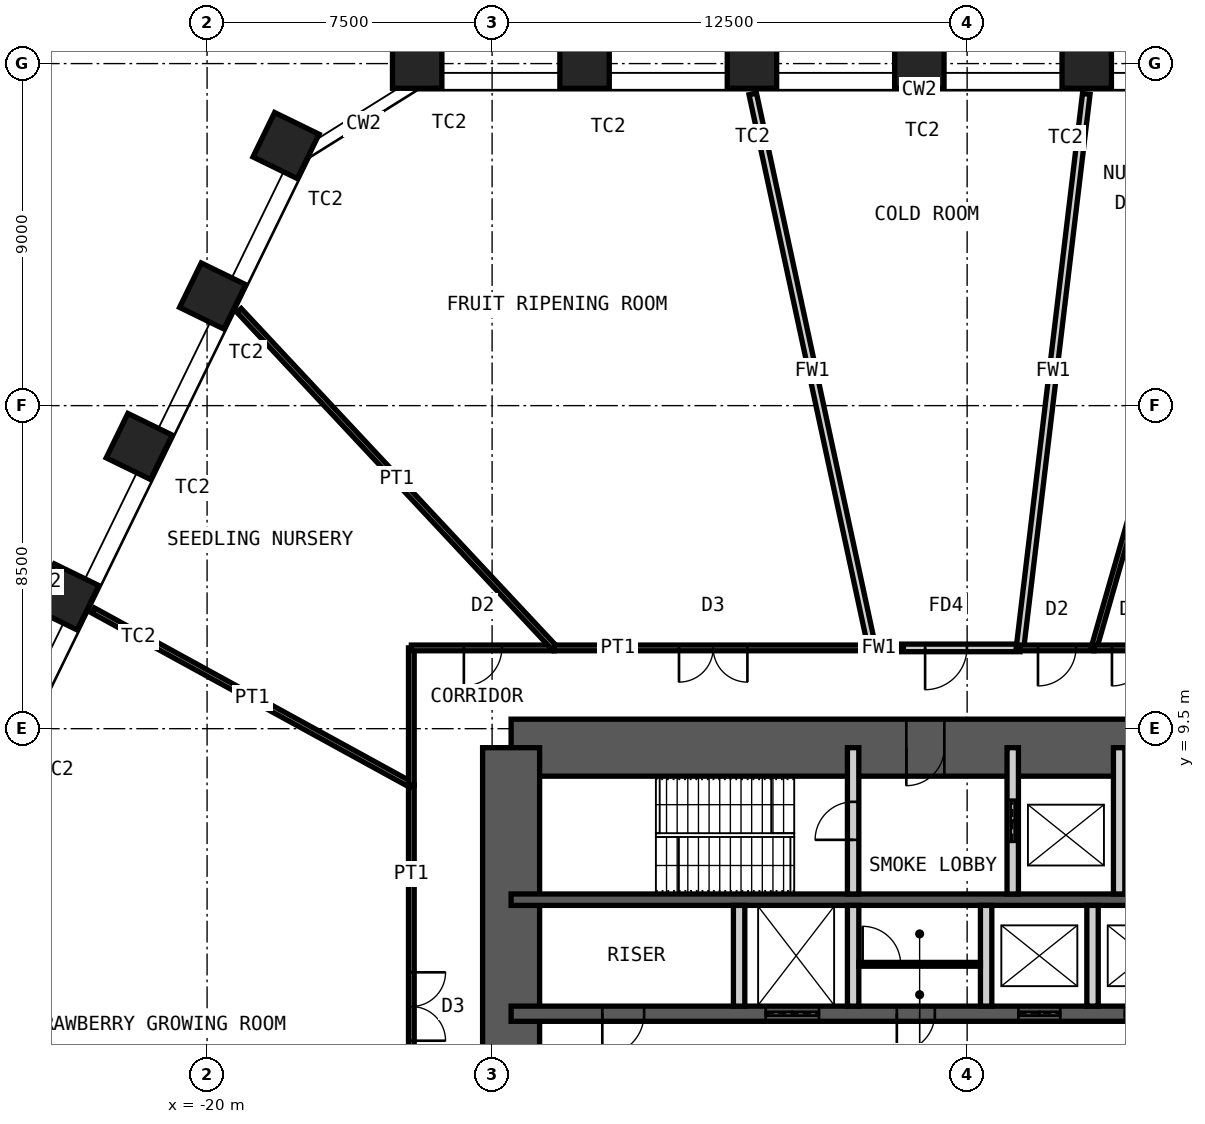
"""IFC4 building model, lengths in metres.
Left out: names, types, materials, properties, quantities, classifications, styles, units other than length and angle.
Written with IfcOpenShell. Run it as: python <this file> out.ifc"""

import sys

from ifc_helpers import new_model, si_unit, direction, frame, frame_2d, origin, origin_2d, place, context, subcontext, project, spatial, rectangle, hollow_rectangle, extrude, element, fill, save


model = new_model("IFC4")
c1 = context("Model", 3, precision=1e-05, world=origin(), true_north=direction((0.0, 1.0)))
c2 = subcontext(c1, "Body", "Model", "MODEL_VIEW")
j1 = project(units=[si_unit("LENGTHUNIT", "METRE"), si_unit("PLANEANGLEUNIT", "RADIAN")], contexts=[c1])
p1 = place(None, origin())
s1 = spatial("IfcSite", under=j1, at=p1, CompositionType="ELEMENT")
p2 = place(p1, origin())
s2 = spatial("IfcBuilding", under=s1, at=p2, CompositionType="ELEMENT")
p3 = place(p2, frame((0.0, 0.0, 77.0)))
s3 = spatial("IfcBuildingStorey", under=s2, at=p3, CompositionType="ELEMENT", Elevation=77.0)
for number, where, z_axis, x_axis in (
    (1, (-14.471, 27.0, 0.0), (0.0, 0.0, 1.0), (-1.0, 0.0, 0.0)),
    (2, (-10.067, 27.0, 0.0), (0.0, 0.0, 1.0), (-1.0, 0.0, 0.0)),
    (3, (-5.662, 27.0, 0.0), (0.0, 0.0, 1.0), (-1.0, 0.0, 0.0)),
    (4, (-1.258, 27.0, 0.0), (0.0, 0.0, 1.0), (-1.0, 0.0, 0.0)),
    (5, (3.147, 27.0, 0.0), (0.0, 0.0, 1.0), (-1.0, 0.0, 0.0)),
    (6, (-23.716, 12.966, 0.0), (0.0, 0.0, 1.0), (-0.438, -0.899, 0.0)),
    (7, (-21.785, 16.925, 0.0), (0.0, 0.0, 1.0), (-0.438, -0.899, 0.0)),
    (8, (-19.854, 20.884, 0.0), (0.0, 0.0, 1.0), (-0.438, -0.899, 0.0)),
    (9, (-17.924, 24.843, 0.0), (0.0, 0.0, 1.0), (-0.438, -0.899, 0.0)),
):
    element("IfcColumn", number, at=place(p3, frame(where, z_axis=z_axis, x_axis=x_axis)), inside=s3, PredefinedType="COLUMN", context=c2, shape_type="SweptSolid", body=[
        extrude(hollow_rectangle(XDim=1.3, YDim=1.3, WallThickness=0.1, at=origin_2d()), origin(), (0.0, 0.0, 1.0), 5.0),
    ])
p4 = place(p3, frame((-12.0, 9.0, 0.0), z_axis=(0.0, 0.0, 1.0), x_axis=(1.0, 0.0, 0.0)))
e10 = element("IfcWall", 10, at=p4, inside=s3, PredefinedType="SHEAR", context=c2, shape_type="SweptSolid", body=[
    extrude(rectangle(XDim=24.0, YDim=1.5, at=frame_2d((12.0, 0.0))), origin(), (0.0, 0.0, 1.0), 5.0),
])
p5 = place(p4, frame((10.4, 0.0, 0.0)))
e11 = element("IfcOpeningElement", 11, at=p5, cuts=e10, PredefinedType="OPENING", context=c2, shape_type="SweptSolid", body=[
    extrude(rectangle(XDim=1.0, YDim=2.1, at=frame_2d((0.5, 1.05))), frame((0.0, 0.76, 0.0), z_axis=(0.0, -1.0, 0.0), x_axis=(1.0, 0.0, 0.0)), (0.0, 0.0, 1.0), 1.52),
])
p6 = place(p4, frame((17.6, 0.0, 0.0)))
e12 = element("IfcOpeningElement", 12, at=p6, cuts=e10, PredefinedType="OPENING", context=c2, shape_type="SweptSolid", body=[
    extrude(rectangle(XDim=0.9, YDim=2.1, at=frame_2d((0.45, 1.05))), frame((0.0, 0.76, 0.0), z_axis=(0.0, -1.0, 0.0), x_axis=(1.0, 0.0, 0.0)), (0.0, 0.0, 1.0), 1.52),
])
p7 = place(p4, frame((21.9, 0.0, 0.0)))
e13 = element("IfcOpeningElement", 13, at=p7, cuts=e10, PredefinedType="OPENING", context=c2, shape_type="SweptSolid", body=[
    extrude(rectangle(XDim=0.9, YDim=2.1, at=frame_2d((0.45, 1.05))), frame((0.0, 0.76, 0.0), z_axis=(0.0, -1.0, 0.0), x_axis=(1.0, 0.0, 0.0)), (0.0, 0.0, 1.0), 1.52),
])
p8 = place(p3, frame((-12.0, -9.0, 0.0), z_axis=(0.0, 0.0, 1.0), x_axis=(0.0, 1.0, 0.0)))
e14 = element("IfcWall", 14, at=p8, inside=s3, PredefinedType="SHEAR", context=c2, shape_type="SweptSolid", body=[
    extrude(rectangle(XDim=18.0, YDim=1.5, at=frame_2d((9.0, 0.0))), origin(), (0.0, 0.0, 1.0), 5.0),
])
p9 = place(p8, frame((8.1, 0.0, 0.0)))
e15 = element("IfcOpeningElement", 15, at=p9, cuts=e14, PredefinedType="OPENING", context=c2, shape_type="SweptSolid", body=[
    extrude(rectangle(XDim=1.8, YDim=2.1, at=frame_2d((0.9, 1.05))), frame((0.0, 0.76, 0.0), z_axis=(0.0, -1.0, 0.0), x_axis=(1.0, 0.0, 0.0)), (0.0, 0.0, 1.0), 1.52),
])
p10 = place(p3, frame((-12.0, 5.0, 0.0), z_axis=(0.0, 0.0, 1.0), x_axis=(1.0, 0.0, 0.0)))
e16 = element("IfcWall", 16, at=p10, inside=s3, PredefinedType="SHEAR", context=c2, shape_type="SweptSolid", body=[
    extrude(rectangle(XDim=24.0, YDim=0.3, at=frame_2d((12.0, 0.0))), origin(), (0.0, 0.0, 1.0), 5.0),
])
p11 = place(p3, frame((-12.0, 2.0, 0.0), z_axis=(0.0, 0.0, 1.0), x_axis=(1.0, 0.0, 0.0)))
e17 = element("IfcWall", 17, at=p11, inside=s3, PredefinedType="SHEAR", context=c2, shape_type="SweptSolid", body=[
    extrude(rectangle(XDim=24.0, YDim=0.4, at=frame_2d((12.0, 0.0))), origin(), (0.0, 0.0, 1.0), 5.0),
])
p12 = place(p11, frame((2.4, 0.0, 0.0)))
e18 = element("IfcOpeningElement", 18, at=p12, cuts=e17, PredefinedType="OPENING", context=c2, shape_type="SweptSolid", body=[
    extrude(rectangle(XDim=1.1, YDim=2.1, at=frame_2d((0.55, 1.05))), frame((0.0, 0.21, 0.0), z_axis=(0.0, -1.0, 0.0), x_axis=(1.0, 0.0, 0.0)), (0.0, 0.0, 1.0), 0.42),
])
p13 = place(p11, frame((22.0, 0.0, 0.0)))
e19 = element("IfcOpeningElement", 19, at=p13, cuts=e17, PredefinedType="OPENING", context=c2, shape_type="SweptSolid", body=[
    extrude(rectangle(XDim=1.1, YDim=2.1, at=frame_2d((0.55, 1.05))), frame((0.0, 0.21, 0.0), z_axis=(0.0, -1.0, 0.0), x_axis=(1.0, 0.0, 0.0)), (0.0, 0.0, 1.0), 0.42),
])
p14 = place(p11, frame((10.15, 0.0, 0.0)))
e20 = element("IfcOpeningElement", 20, at=p14, cuts=e17, PredefinedType="OPENING", context=c2, shape_type="SweptSolid", body=[
    extrude(rectangle(XDim=1.0, YDim=2.1, at=frame_2d((0.5, 1.05))), frame((0.0, 0.21, 0.0), z_axis=(0.0, -1.0, 0.0), x_axis=(1.0, 0.0, 0.0)), (0.0, 0.0, 1.0), 0.42),
])
p15 = place(p11, frame((6.7, 0.0, 0.0)))
e21 = element("IfcOpeningElement", 21, at=p15, cuts=e17, PredefinedType="OPENING", context=c2, shape_type="SweptSolid", body=[
    extrude(rectangle(XDim=1.4, YDim=2.4, at=frame_2d((0.7, 1.2))), frame((0.0, 0.21, 0.0), z_axis=(0.0, -1.0, 0.0), x_axis=(1.0, 0.0, 0.0)), (0.0, 0.0, 1.0), 0.42),
])
p16 = place(p11, frame((13.35, 0.0, 0.0)))
e22 = element("IfcOpeningElement", 22, at=p16, cuts=e17, PredefinedType="OPENING", context=c2, shape_type="SweptSolid", body=[
    extrude(rectangle(XDim=1.1, YDim=2.4, at=frame_2d((0.55, 1.2))), frame((0.0, 0.21, 0.0), z_axis=(0.0, -1.0, 0.0), x_axis=(1.0, 0.0, 0.0)), (0.0, 0.0, 1.0), 0.42),
])
p17 = place(p11, frame((16.15, 0.0, 0.0)))
e23 = element("IfcOpeningElement", 23, at=p17, cuts=e17, PredefinedType="OPENING", context=c2, shape_type="SweptSolid", body=[
    extrude(rectangle(XDim=1.1, YDim=2.4, at=frame_2d((0.55, 1.2))), frame((0.0, 0.21, 0.0), z_axis=(0.0, -1.0, 0.0), x_axis=(1.0, 0.0, 0.0)), (0.0, 0.0, 1.0), 0.42),
])
p18 = place(p11, frame((18.95, 0.0, 0.0)))
e24 = element("IfcOpeningElement", 24, at=p18, cuts=e17, PredefinedType="OPENING", context=c2, shape_type="SweptSolid", body=[
    extrude(rectangle(XDim=1.1, YDim=2.4, at=frame_2d((0.55, 1.2))), frame((0.0, 0.21, 0.0), z_axis=(0.0, -1.0, 0.0), x_axis=(1.0, 0.0, 0.0)), (0.0, 0.0, 1.0), 0.42),
])
p19 = place(p3, frame((-3.0, 5.15, 0.0), z_axis=(0.0, 0.0, 1.0), x_axis=(0.0, 1.0, 0.0)))
e25 = element("IfcWall", 25, at=p19, inside=s3, PredefinedType="PARTITIONING", context=c2, shape_type="SweptSolid", body=[
    extrude(rectangle(XDim=3.85, YDim=0.3, at=frame_2d((1.925, 0.0))), origin(), (0.0, 0.0, 1.0), 4.78),
])
p20 = place(p19, frame((1.425, 0.0, 0.0)))
e26 = element("IfcOpeningElement", 26, at=p20, cuts=e25, PredefinedType="OPENING", context=c2, shape_type="SweptSolid", body=[
    extrude(rectangle(XDim=1.0, YDim=2.1, at=frame_2d((0.5, 1.05))), frame((0.0, 0.16, 0.0), z_axis=(0.0, -1.0, 0.0), x_axis=(1.0, 0.0, 0.0)), (0.0, 0.0, 1.0), 0.32),
])
p21 = place(p3, frame((1.2, 5.15, 0.0), z_axis=(0.0, 0.0, 1.0), x_axis=(0.0, 1.0, 0.0)))
e27 = element("IfcWall", 27, at=p21, inside=s3, PredefinedType="PARTITIONING", context=c2, shape_type="SweptSolid", body=[
    extrude(rectangle(XDim=3.85, YDim=0.3, at=frame_2d((1.925, 0.0))), origin(), (0.0, 0.0, 1.0), 4.78),
])
p22 = place(p21, frame((1.375, 0.0, 0.0)))
e28 = element("IfcOpeningElement", 28, at=p22, cuts=e27, PredefinedType="OPENING", context=c2, shape_type="SweptSolid", body=[
    extrude(rectangle(XDim=1.1, YDim=2.4, at=frame_2d((0.55, 1.2))), frame((0.0, 0.16, 0.0), z_axis=(0.0, -1.0, 0.0), x_axis=(1.0, 0.0, 0.0)), (0.0, 0.0, 1.0), 0.32),
])
p23 = place(p3, frame((4.0, 5.15, 0.0), z_axis=(0.0, 0.0, 1.0), x_axis=(0.0, 1.0, 0.0)))
e29 = element("IfcWall", 29, at=p23, inside=s3, PredefinedType="PARTITIONING", context=c2, shape_type="SweptSolid", body=[
    extrude(rectangle(XDim=3.85, YDim=0.3, at=frame_2d((1.925, 0.0))), origin(), (0.0, 0.0, 1.0), 4.78),
])
for number, where, z_axis, x_axis in (
    (30, (-6.0, 2.2, 0.0), (0.0, 0.0, 1.0), (0.0, 1.0, 0.0)),
    (31, (-3.0, 2.2, 0.0), (0.0, 0.0, 1.0), (0.0, 1.0, 0.0)),
    (32, (0.5, 2.2, 0.0), (0.0, 0.0, 1.0), (0.0, 1.0, 0.0)),
    (33, (3.3, 2.2, 0.0), (0.0, 0.0, 1.0), (0.0, 1.0, 0.0)),
):
    element("IfcWall", number, at=place(p3, frame(where, z_axis=z_axis, x_axis=x_axis)), inside=s3, PredefinedType="PARTITIONING", context=c2, shape_type="SweptSolid", body=[
        extrude(rectangle(XDim=2.65, YDim=0.3, at=frame_2d((1.325, 0.0))), origin(), (0.0, 0.0, 1.0), 4.78),
    ])
p24 = place(p3, frame((-2.85, 3.3, 0.0), z_axis=(0.0, 0.0, 1.0), x_axis=(1.0, 0.0, 0.0)))
e34 = element("IfcWall", 34, at=p24, inside=s3, PredefinedType="PARTITIONING", context=c2, shape_type="SweptSolid", body=[
    extrude(rectangle(XDim=3.2, YDim=0.1, at=frame_2d((1.6, 0.0))), origin(), (0.0, 0.0, 1.0), 4.78),
])
p25 = place(p24, frame((0.1, 0.0, 0.0)))
e35 = element("IfcOpeningElement", 35, at=p25, cuts=e34, PredefinedType="OPENING", context=c2, shape_type="SweptSolid", body=[
    extrude(rectangle(XDim=1.0, YDim=2.4, at=frame_2d((0.5, 1.2))), frame((0.0, 0.06, 0.0), z_axis=(0.0, -1.0, 0.0), x_axis=(1.0, 0.0, 0.0)), (0.0, 0.0, 1.0), 0.12),
])
p26 = place(p3, frame((-14.625, -3.641, 0.0), z_axis=(0.0, 0.0, 1.0), x_axis=(0.0, 1.0, 0.0)))
e36 = element("IfcWall", 36, at=p26, inside=s3, PredefinedType="PARTITIONING", context=c2, shape_type="SweptSolid", body=[
    extrude(rectangle(XDim=11.66, YDim=0.15, at=frame_2d((5.83, 0.0))), origin(), (0.0, 0.0, 1.0), 4.8),
])
p27 = place(p26, frame((4.93, 0.0, 0.0)))
e37 = element("IfcOpeningElement", 37, at=p27, cuts=e36, PredefinedType="OPENING", context=c2, shape_type="SweptSolid", body=[
    extrude(rectangle(XDim=1.8, YDim=2.4, at=frame_2d((0.9, 1.2))), frame((0.0, 0.085, 0.0), z_axis=(0.0, -1.0, 0.0), x_axis=(1.0, 0.0, 0.0)), (0.0, 0.0, 1.0), 0.17),
])
p28 = place(p3, frame((-22.999, 12.612, 0.0), z_axis=(0.0, 0.0, 1.0), x_axis=(0.876825619135, -0.480808520752, 0.0)))
e38 = element("IfcWall", 38, at=p28, inside=s3, PredefinedType="PARTITIONING", context=c2, shape_type="SweptSolid", body=[
    extrude(rectangle(XDim=9.551, YDim=0.15, at=frame_2d((4.775, 0.0))), origin(), (0.0, 0.0, 1.0), 3.7),
])
p29 = place(p3, frame((-14.625, 8.02, 0.0), z_axis=(0.0, 0.0, 1.0), x_axis=(0.0, 1.0, 0.0)))
e39 = element("IfcWall", 39, at=p29, inside=s3, PredefinedType="PARTITIONING", context=c2, shape_type="SweptSolid", body=[
    extrude(rectangle(XDim=3.605, YDim=0.15, at=frame_2d((1.803, 0.0))), origin(), (0.0, 0.0, 1.0), 4.8),
])
p30 = place(p3, frame((-14.625, 11.625, 0.0), z_axis=(0.0, 0.0, 1.0), x_axis=(1.0, 0.0, 0.0)))
e40 = element("IfcWall", 40, at=p30, inside=s3, PredefinedType="PARTITIONING", context=c2, shape_type="SweptSolid", body=[
    extrude(rectangle(XDim=3.764, YDim=0.15, at=frame_2d((1.882, 0.0))), origin(), (0.0, 0.0, 1.0), 4.8),
])
p31 = place(p30, frame((1.382, 0.0, 0.0)))
e41 = element("IfcOpeningElement", 41, at=p31, cuts=e40, PredefinedType="OPENING", context=c2, shape_type="SweptSolid", body=[
    extrude(rectangle(XDim=1.0, YDim=2.4, at=frame_2d((0.5, 1.2))), frame((0.0, 0.085, 0.0), z_axis=(0.0, -1.0, 0.0), x_axis=(1.0, 0.0, 0.0)), (0.0, 0.0, 1.0), 0.17),
])
p32 = place(p3, frame((-19.157, 20.504, 0.0), z_axis=(0.0, 0.0, 1.0), x_axis=(0.682689688298, -0.73070841619, 0.0)))
e42 = element("IfcWall", 42, at=p32, inside=s3, PredefinedType="PARTITIONING", context=c2, shape_type="SweptSolid", body=[
    extrude(rectangle(XDim=12.151, YDim=0.15, at=frame_2d((6.076, 0.0))), origin(), (0.0, 0.0, 1.0), 3.7),
])
p33 = place(p3, frame((-10.861, 11.625, 0.0), z_axis=(0.0, 0.0, 1.0), x_axis=(1.0, 0.0, 0.0)))
e43 = element("IfcWall", 43, at=p33, inside=s3, PredefinedType="PARTITIONING", context=c2, shape_type="SweptSolid", body=[
    extrude(rectangle(XDim=8.359, YDim=0.15, at=frame_2d((4.179, 0.0))), origin(), (0.0, 0.0, 1.0), 4.8),
])
p34 = place(p33, frame((3.279, 0.0, 0.0)))
e44 = element("IfcOpeningElement", 44, at=p34, cuts=e43, PredefinedType="OPENING", context=c2, shape_type="SweptSolid", body=[
    extrude(rectangle(XDim=1.8, YDim=2.4, at=frame_2d((0.9, 1.2))), frame((0.0, 0.085, 0.0), z_axis=(0.0, -1.0, 0.0), x_axis=(1.0, 0.0, 0.0)), (0.0, 0.0, 1.0), 0.17),
])
p35 = place(p3, frame((-5.641, 26.202, 0.0), z_axis=(0.0, 0.0, 1.0), x_axis=(0.210474950898, -0.977599250738, 0.0)))
e45 = element("IfcWall", 45, at=p35, inside=s3, PredefinedType="PARTITIONING", context=c2, shape_type="SweptSolid", body=[
    extrude(rectangle(XDim=14.911, YDim=0.2, at=frame_2d((7.456, 0.0))), origin(), (0.0, 0.0, 1.0), 3.7),
])
p36 = place(p3, frame((-2.503, 11.625, 0.0), z_axis=(0.0, 0.0, 1.0), x_axis=(1.0, 0.0, 0.0)))
e46 = element("IfcWall", 46, at=p36, inside=s3, PredefinedType="PARTITIONING", context=c2, shape_type="SweptSolid", body=[
    extrude(rectangle(XDim=3.894, YDim=0.2, at=frame_2d((1.947, 0.0))), origin(), (0.0, 0.0, 1.0), 4.8),
])
p37 = place(p36, frame((1.397, 0.0, 0.0)))
e47 = element("IfcOpeningElement", 47, at=p37, cuts=e46, PredefinedType="OPENING", context=c2, shape_type="SweptSolid", body=[
    extrude(rectangle(XDim=1.1, YDim=2.1, at=frame_2d((0.55, 1.05))), frame((0.0, 0.11, 0.0), z_axis=(0.0, -1.0, 0.0), x_axis=(1.0, 0.0, 0.0)), (0.0, 0.0, 1.0), 0.22),
])
p38 = place(p3, frame((3.135, 26.201, 0.0), z_axis=(0.0, 0.0, 1.0), x_axis=(-0.118796980211, -0.992918565388, 0.0)))
e48 = element("IfcWall", 48, at=p38, inside=s3, PredefinedType="PARTITIONING", context=c2, shape_type="SweptSolid", body=[
    extrude(rectangle(XDim=14.68, YDim=0.2, at=frame_2d((7.34, 0.0))), origin(), (0.0, 0.0, 1.0), 3.7),
])
p39 = place(p3, frame((1.391, 11.625, 0.0), z_axis=(0.0, 0.0, 1.0), x_axis=(1.0, 0.0, 0.0)))
e49 = element("IfcWall", 49, at=p39, inside=s3, PredefinedType="PARTITIONING", context=c2, shape_type="SweptSolid", body=[
    extrude(rectangle(XDim=1.947, YDim=0.15, at=frame_2d((0.973, 0.0))), origin(), (0.0, 0.0, 1.0), 4.8),
])
p40 = place(p39, frame((0.473, 0.0, 0.0)))
e50 = element("IfcOpeningElement", 50, at=p40, cuts=e49, PredefinedType="OPENING", context=c2, shape_type="SweptSolid", body=[
    extrude(rectangle(XDim=1.0, YDim=2.4, at=frame_2d((0.5, 1.2))), frame((0.0, 0.085, 0.0), z_axis=(0.0, -1.0, 0.0), x_axis=(1.0, 0.0, 0.0)), (0.0, 0.0, 1.0), 0.17),
])
p41 = place(p3, frame((7.524, 26.204, 0.0), z_axis=(0.0, 0.0, 1.0), x_axis=(-0.275979405656, -0.961163548858, 0.0)))
e51 = element("IfcWall", 51, at=p41, inside=s3, PredefinedType="PARTITIONING", context=c2, shape_type="SweptSolid", body=[
    extrude(rectangle(XDim=15.168, YDim=0.15, at=frame_2d((7.584, 0.0))), origin(), (0.0, 0.0, 1.0), 3.7),
])
p42 = place(p3, frame((3.338, 11.625, 0.0), z_axis=(0.0, 0.0, 1.0), x_axis=(1.0, 0.0, 0.0)))
e52 = element("IfcWall", 52, at=p42, inside=s3, PredefinedType="PARTITIONING", context=c2, shape_type="SweptSolid", body=[
    extrude(rectangle(XDim=1.947, YDim=0.15, at=frame_2d((0.974, 0.0))), origin(), (0.0, 0.0, 1.0), 4.8),
])
p43 = place(p42, frame((0.473, 0.0, 0.0)))
e53 = element("IfcOpeningElement", 53, at=p43, cuts=e52, PredefinedType="OPENING", context=c2, shape_type="SweptSolid", body=[
    extrude(rectangle(XDim=1.0, YDim=2.4, at=frame_2d((0.5, 1.2))), frame((0.0, 0.085, 0.0), z_axis=(0.0, -1.0, 0.0), x_axis=(1.0, 0.0, 0.0)), (0.0, 0.0, 1.0), 0.17),
])
p44 = place(p5, origin())
e54 = element("IfcDoor", 54, at=p44, inside=s3, OperationType="SINGLE_SWING_LEFT", PredefinedType="DOOR", context=c2, shape_type="SweptSolid", body=[
    extrude(rectangle(XDim=1.0, YDim=2.1, at=frame_2d((0.5, 1.05))), frame((0.0, 0.025, 0.0), z_axis=(0.0, -1.0, 0.0), x_axis=(1.0, 0.0, 0.0)), (0.0, 0.0, 1.0), 0.05),
])
fill(e11, e54)
p45 = place(p20, origin())
e55 = element("IfcDoor", 55, at=p45, inside=s3, OperationType="SINGLE_SWING_RIGHT", PredefinedType="DOOR", context=c2, shape_type="SweptSolid", body=[
    extrude(rectangle(XDim=1.0, YDim=2.1, at=frame_2d((0.5, 1.05))), frame((0.0, 0.025, 0.0), z_axis=(0.0, -1.0, 0.0), x_axis=(1.0, 0.0, 0.0)), (0.0, 0.0, 1.0), 0.05),
])
fill(e26, e55)
p46 = place(p12, origin())
e56 = element("IfcDoor", 56, at=p46, inside=s3, OperationType="SINGLE_SWING_LEFT", PredefinedType="DOOR", context=c2, shape_type="SweptSolid", body=[
    extrude(rectangle(XDim=1.1, YDim=2.1, at=frame_2d((0.55, 1.05))), frame((0.0, 0.025, 0.0), z_axis=(0.0, -1.0, 0.0), x_axis=(1.0, 0.0, 0.0)), (0.0, 0.0, 1.0), 0.05),
])
fill(e18, e56)
p47 = place(p14, origin())
e57 = element("IfcDoor", 57, at=p47, inside=s3, OperationType="SINGLE_SWING_LEFT", PredefinedType="DOOR", context=c2, shape_type="SweptSolid", body=[
    extrude(rectangle(XDim=1.0, YDim=2.1, at=frame_2d((0.5, 1.05))), frame((0.0, 0.025, 0.0), z_axis=(0.0, -1.0, 0.0), x_axis=(1.0, 0.0, 0.0)), (0.0, 0.0, 1.0), 0.05),
])
fill(e20, e57)
p48 = place(p22, origin())
e58 = element("IfcDoor", 58, at=p48, inside=s3, OperationType="DOUBLE_DOOR_SLIDING", PredefinedType="DOOR", context=c2, shape_type="SweptSolid", body=[
    extrude(rectangle(XDim=1.1, YDim=2.4, at=frame_2d((0.55, 1.2))), frame((0.0, 0.025, 0.0), z_axis=(0.0, -1.0, 0.0), x_axis=(1.0, 0.0, 0.0)), (0.0, 0.0, 1.0), 0.05),
])
fill(e28, e58)
p49 = place(p15, origin())
e59 = element("IfcDoor", 59, at=p49, inside=s3, OperationType="DOUBLE_DOOR_SLIDING", PredefinedType="DOOR", context=c2, shape_type="SweptSolid", body=[
    extrude(rectangle(XDim=1.4, YDim=2.4, at=frame_2d((0.7, 1.2))), frame((0.0, 0.025, 0.0), z_axis=(0.0, -1.0, 0.0), x_axis=(1.0, 0.0, 0.0)), (0.0, 0.0, 1.0), 0.05),
])
fill(e21, e59)
p50 = place(p16, origin())
e60 = element("IfcDoor", 60, at=p50, inside=s3, OperationType="DOUBLE_DOOR_SLIDING", PredefinedType="DOOR", context=c2, shape_type="SweptSolid", body=[
    extrude(rectangle(XDim=1.1, YDim=2.4, at=frame_2d((0.55, 1.2))), frame((0.0, 0.025, 0.0), z_axis=(0.0, -1.0, 0.0), x_axis=(1.0, 0.0, 0.0)), (0.0, 0.0, 1.0), 0.05),
])
fill(e22, e60)
p51 = place(p25, origin())
e61 = element("IfcDoor", 61, at=p51, inside=s3, OperationType="SINGLE_SWING_RIGHT", PredefinedType="DOOR", context=c2, shape_type="SweptSolid", body=[
    extrude(rectangle(XDim=1.0, YDim=2.4, at=frame_2d((0.5, 1.2))), frame((0.0, 0.025, 0.0), z_axis=(0.0, -1.0, 0.0), x_axis=(1.0, 0.0, 0.0)), (0.0, 0.0, 1.0), 0.05),
])
fill(e35, e61)
p52 = place(p27, origin())
e62 = element("IfcDoor", 62, at=p52, inside=s3, OperationType="DOUBLE_DOOR_DOUBLE_SWING", PredefinedType="DOOR", context=c2, shape_type="SweptSolid", body=[
    extrude(rectangle(XDim=1.8, YDim=2.4, at=frame_2d((0.9, 1.2))), frame((0.0, 0.025, 0.0), z_axis=(0.0, -1.0, 0.0), x_axis=(1.0, 0.0, 0.0)), (0.0, 0.0, 1.0), 0.05),
])
fill(e37, e62)
p53 = place(p31, origin())
e63 = element("IfcDoor", 63, at=p53, inside=s3, OperationType="SINGLE_SWING_LEFT", PredefinedType="DOOR", context=c2, shape_type="SweptSolid", body=[
    extrude(rectangle(XDim=1.0, YDim=2.4, at=frame_2d((0.5, 1.2))), frame((0.0, 0.025, 0.0), z_axis=(0.0, -1.0, 0.0), x_axis=(1.0, 0.0, 0.0)), (0.0, 0.0, 1.0), 0.05),
])
fill(e41, e63)
p54 = place(p34, origin())
e64 = element("IfcDoor", 64, at=p54, inside=s3, OperationType="DOUBLE_DOOR_DOUBLE_SWING", PredefinedType="DOOR", context=c2, shape_type="SweptSolid", body=[
    extrude(rectangle(XDim=1.8, YDim=2.4, at=frame_2d((0.9, 1.2))), frame((0.0, 0.025, 0.0), z_axis=(0.0, -1.0, 0.0), x_axis=(1.0, 0.0, 0.0)), (0.0, 0.0, 1.0), 0.05),
])
fill(e44, e64)
p55 = place(p37, origin())
e65 = element("IfcDoor", 65, at=p55, inside=s3, OperationType="SINGLE_SWING_LEFT", PredefinedType="DOOR", context=c2, shape_type="SweptSolid", body=[
    extrude(rectangle(XDim=1.1, YDim=2.1, at=frame_2d((0.55, 1.05))), frame((0.0, 0.025, 0.0), z_axis=(0.0, -1.0, 0.0), x_axis=(1.0, 0.0, 0.0)), (0.0, 0.0, 1.0), 0.05),
])
fill(e47, e65)
p56 = place(p40, origin())
e66 = element("IfcDoor", 66, at=p56, inside=s3, OperationType="SINGLE_SWING_LEFT", PredefinedType="DOOR", context=c2, shape_type="SweptSolid", body=[
    extrude(rectangle(XDim=1.0, YDim=2.4, at=frame_2d((0.5, 1.2))), frame((0.0, 0.025, 0.0), z_axis=(0.0, -1.0, 0.0), x_axis=(1.0, 0.0, 0.0)), (0.0, 0.0, 1.0), 0.05),
])
fill(e50, e66)
p57 = place(p43, origin())
e67 = element("IfcDoor", 67, at=p57, inside=s3, OperationType="SINGLE_SWING_LEFT", PredefinedType="DOOR", context=c2, shape_type="SweptSolid", body=[
    extrude(rectangle(XDim=1.0, YDim=2.4, at=frame_2d((0.5, 1.2))), frame((0.0, 0.025, 0.0), z_axis=(0.0, -1.0, 0.0), x_axis=(1.0, 0.0, 0.0)), (0.0, 0.0, 1.0), 0.05),
])
fill(e53, e67)
save(model, sys.argv[1])
